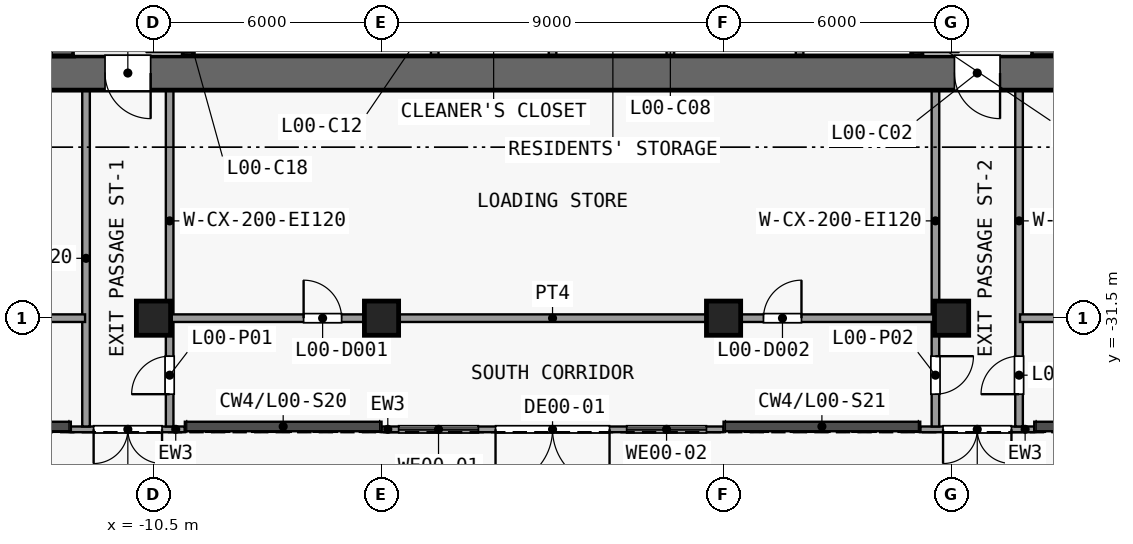
"""IFC4 building model, lengths in metres.
Left out: names, types, materials, properties, quantities, classifications, styles, units other than length and angle.
Written with IfcOpenShell. Run it as: python <this file> out.ifc"""

import sys

from ifc_helpers import new_model, si_unit, direction, frame, frame_2d, origin, origin_2d, place, context, subcontext, project, spatial, rectangle, extrude, element, fill, save


model = new_model("IFC4")
c1 = context("Model", 3, precision=1e-05, world=origin(), true_north=direction((0.0, 1.0)))
c2 = subcontext(c1, "Body", "Model", "MODEL_VIEW")
j1 = project(units=[si_unit("LENGTHUNIT", "METRE"), si_unit("PLANEANGLEUNIT", "RADIAN")], contexts=[c1])
p1 = place(None, origin())
s1 = spatial("IfcSite", under=j1, at=p1, CompositionType="ELEMENT")
p2 = place(p1, origin())
s2 = spatial("IfcBuilding", under=s1, at=p2, CompositionType="ELEMENT")
p3 = place(p2, origin())
s3 = spatial("IfcBuildingStorey", under=s2, at=p3, CompositionType="ELEMENT", Elevation=0.0)
for number, where, z_axis, x_axis in (
    (1, (-10.5, -31.5, 0.0), (0.0, 0.0, 1.0), (1.0, 0.0, 0.0)),
    (2, (-4.5, -31.5, 0.0), (0.0, 0.0, 1.0), (1.0, 0.0, 0.0)),
    (3, (4.5, -31.5, 0.0), (0.0, 0.0, 1.0), (1.0, 0.0, 0.0)),
    (4, (10.5, -31.5, 0.0), (0.0, 0.0, 1.0), (1.0, 0.0, 0.0)),
):
    element("IfcColumn", number, at=place(p3, frame(where, z_axis=z_axis, x_axis=x_axis)), inside=s3, PredefinedType="COLUMN", context=c2, shape_type="SweptSolid", body=[
        extrude(rectangle(XDim=0.9, YDim=0.9, at=origin_2d()), origin(), (0.0, 0.0, 1.0), 8.0),
    ])
p4 = place(p3, frame((13.5, -25.05, 0.0), z_axis=(0.0, 0.0, 1.0), x_axis=(-1.0, 0.0, 0.0)))
e5 = element("IfcWall", 5, at=p4, inside=s3, PredefinedType="SHEAR", context=c2, shape_type="SweptSolid", body=[
    extrude(rectangle(XDim=27.0, YDim=0.9, at=frame_2d((13.5, 0.0))), origin(), (0.0, 0.0, 1.0), 7.65),
])
p5 = place(p4, frame((24.075, 0.0, 0.0)))
e6 = element("IfcOpeningElement", 6, at=p5, cuts=e5, PredefinedType="OPENING", context=c2, shape_type="SweptSolid", body=[
    extrude(rectangle(XDim=1.2, YDim=2.1, at=frame_2d((0.6, 1.05))), frame((0.0, 0.46, 0.0), z_axis=(0.0, -1.0, 0.0), x_axis=(1.0, 0.0, 0.0)), (0.0, 0.0, 1.0), 0.92),
])
p6 = place(p4, frame((1.725, 0.0, 0.0)))
e7 = element("IfcOpeningElement", 7, at=p6, cuts=e5, PredefinedType="OPENING", context=c2, shape_type="SweptSolid", body=[
    extrude(rectangle(XDim=1.2, YDim=2.1, at=frame_2d((0.6, 1.05))), frame((0.0, 0.46, 0.0), z_axis=(0.0, -1.0, 0.0), x_axis=(1.0, 0.0, 0.0)), (0.0, 0.0, 1.0), 0.92),
])
p7 = place(p3, frame((-13.05, -8.5, 0.0), z_axis=(0.0, 0.0, 1.0), x_axis=(0.0, -1.0, 0.0)))
e8 = element("IfcWall", 8, at=p7, inside=s3, PredefinedType="SHEAR", context=c2, shape_type="SweptSolid", body=[
    extrude(rectangle(XDim=16.1, YDim=0.9, at=frame_2d((8.05, 0.0))), origin(), (0.0, 0.0, 1.0), 7.65),
])
p8 = place(p7, frame((14.8, 0.0, 0.0)))
e9 = element("IfcOpeningElement", 9, at=p8, cuts=e8, PredefinedType="OPENING", context=c2, shape_type="SweptSolid", body=[
    extrude(rectangle(XDim=1.1, YDim=2.1, at=frame_2d((0.55, 1.05))), frame((0.0, 0.46, 0.0), z_axis=(0.0, -1.0, 0.0), x_axis=(1.0, 0.0, 0.0)), (0.0, 0.0, 1.0), 0.92),
])
p9 = place(p3, frame((13.05, -24.6, 0.0), z_axis=(0.0, 0.0, 1.0), x_axis=(0.0, 1.0, 0.0)))
e10 = element("IfcWall", 10, at=p9, inside=s3, PredefinedType="SHEAR", context=c2, shape_type="SweptSolid", body=[
    extrude(rectangle(XDim=16.1, YDim=0.9, at=frame_2d((8.05, 0.0))), origin(), (0.0, 0.0, 1.0), 7.65),
])
p10 = place(p3, frame((-9.6, -24.6, 0.0), z_axis=(0.0, 0.0, 1.0), x_axis=(0.0, 1.0, 0.0)))
e11 = element("IfcWall", 11, at=p10, inside=s3, PredefinedType="SHEAR", context=c2, shape_type="SweptSolid", body=[
    extrude(rectangle(XDim=7.7, YDim=0.3, at=frame_2d((3.85, 0.0))), origin(), (0.0, 0.0, 1.0), 7.65),
])
p11 = place(p10, frame((0.1, 0.0, 0.0)))
e12 = element("IfcOpeningElement", 12, at=p11, cuts=e11, PredefinedType="OPENING", context=c2, shape_type="SweptSolid", body=[
    extrude(rectangle(XDim=1.1, YDim=2.1, at=frame_2d((0.55, 1.05))), frame((0.0, 0.16, 0.0), z_axis=(0.0, -1.0, 0.0), x_axis=(1.0, 0.0, 0.0)), (0.0, 0.0, 1.0), 0.32),
])
p12 = place(p3, frame((-3.1, -22.55, 0.0), z_axis=(0.0, 0.0, 1.0), x_axis=(0.0, -1.0, 0.0)))
e13 = element("IfcWall", 13, at=p12, inside=s3, PredefinedType="PARTITIONING", context=c2, shape_type="SweptSolid", body=[
    extrude(rectangle(XDim=2.05, YDim=0.2, at=frame_2d((1.025, 0.0))), origin(), (0.0, 0.0, 1.0), 7.65),
])
p13 = place(p12, frame((0.5, 0.0, 0.0)))
e14 = element("IfcOpeningElement", 14, at=p13, cuts=e13, PredefinedType="OPENING", context=c2, shape_type="SweptSolid", body=[
    extrude(rectangle(XDim=0.9, YDim=2.1, at=frame_2d((0.45, 1.05))), frame((0.0, 0.11, 0.0), z_axis=(0.0, -1.0, 0.0), x_axis=(1.0, 0.0, 0.0)), (0.0, 0.0, 1.0), 0.22),
])
p14 = place(p3, frame((0.0, -24.6, 0.0), z_axis=(0.0, 0.0, 1.0), x_axis=(0.0, 1.0, 0.0)))
e15 = element("IfcWall", 15, at=p14, inside=s3, PredefinedType="PARTITIONING", context=c2, shape_type="SweptSolid", body=[
    extrude(rectangle(XDim=2.05, YDim=0.2, at=frame_2d((1.025, 0.0))), origin(), (0.0, 0.0, 1.0), 7.65),
])
p15 = place(p3, frame((3.1, -24.6, 0.0), z_axis=(0.0, 0.0, 1.0), x_axis=(0.0, 1.0, 0.0)))
e16 = element("IfcWall", 16, at=p15, inside=s3, PredefinedType="PARTITIONING", context=c2, shape_type="SweptSolid", body=[
    extrude(rectangle(XDim=2.05, YDim=0.2, at=frame_2d((1.025, 0.0))), origin(), (0.0, 0.0, 1.0), 7.65),
])
p16 = place(p15, frame((0.65, 0.0, 0.0)))
e17 = element("IfcOpeningElement", 17, at=p16, cuts=e16, PredefinedType="OPENING", context=c2, shape_type="SweptSolid", body=[
    extrude(rectangle(XDim=0.9, YDim=2.1, at=frame_2d((0.45, 1.05))), frame((0.0, 0.11, 0.0), z_axis=(0.0, -1.0, 0.0), x_axis=(1.0, 0.0, 0.0)), (0.0, 0.0, 1.0), 0.22),
])
p17 = place(p3, frame((6.5, -22.55, 0.0), z_axis=(0.0, 0.0, 1.0), x_axis=(0.0, -1.0, 0.0)))
e18 = element("IfcWall", 18, at=p17, inside=s3, PredefinedType="PARTITIONING", context=c2, shape_type="SweptSolid", body=[
    extrude(rectangle(XDim=2.05, YDim=0.2, at=frame_2d((1.025, 0.0))), origin(), (0.0, 0.0, 1.0), 7.65),
])
p18 = place(p17, frame((0.35, 0.0, 0.0)))
e19 = element("IfcOpeningElement", 19, at=p18, cuts=e18, PredefinedType="OPENING", context=c2, shape_type="SweptSolid", body=[
    extrude(rectangle(XDim=1.2, YDim=2.1, at=frame_2d((0.6, 1.05))), frame((0.0, 0.11, 0.0), z_axis=(0.0, -1.0, 0.0), x_axis=(1.0, 0.0, 0.0)), (0.0, 0.0, 1.0), 0.22),
])
p19 = place(p3, frame((9.6, -16.9, 0.0), z_axis=(0.0, 0.0, 1.0), x_axis=(0.0, -1.0, 0.0)))
e20 = element("IfcWall", 20, at=p19, inside=s3, PredefinedType="SHEAR", context=c2, shape_type="SweptSolid", body=[
    extrude(rectangle(XDim=7.7, YDim=0.3, at=frame_2d((3.85, 0.0))), origin(), (0.0, 0.0, 1.0), 7.65),
])
p20 = place(p19, frame((6.5, 0.0, 0.0)))
e21 = element("IfcOpeningElement", 21, at=p20, cuts=e20, PredefinedType="OPENING", context=c2, shape_type="SweptSolid", body=[
    extrude(rectangle(XDim=1.1, YDim=2.1, at=frame_2d((0.55, 1.05))), frame((0.0, 0.16, 0.0), z_axis=(0.0, -1.0, 0.0), x_axis=(1.0, 0.0, 0.0)), (0.0, 0.0, 1.0), 0.32),
])
p21 = place(p3, frame((-12.275, -25.5, 0.0), z_axis=(0.0, 0.0, 1.0), x_axis=(0.0, -1.0, 0.0)))
e22 = element("IfcWall", 22, at=p21, inside=s3, PredefinedType="PARTITIONING", context=c2, shape_type="SweptSolid", body=[
    extrude(rectangle(XDim=8.85, YDim=0.2, at=frame_2d((4.425, 0.0))), origin(), (0.0, 0.0, 1.0), 7.65),
])
p22 = place(p3, frame((-10.075, -34.35, 0.0), z_axis=(0.0, 0.0, 1.0), x_axis=(0.0, 1.0, 0.0)))
e23 = element("IfcWall", 23, at=p22, inside=s3, PredefinedType="PARTITIONING", context=c2, shape_type="SweptSolid", body=[
    extrude(rectangle(XDim=8.85, YDim=0.2, at=frame_2d((4.425, 0.0))), origin(), (0.0, 0.0, 1.0), 7.65),
])
p23 = place(p22, frame((0.85, 0.0, 0.0)))
e24 = element("IfcOpeningElement", 24, at=p23, cuts=e23, PredefinedType="OPENING", context=c2, shape_type="SweptSolid", body=[
    extrude(rectangle(XDim=1.0, YDim=2.1, at=frame_2d((0.5, 1.05))), frame((0.0, 0.11, 0.0), z_axis=(0.0, -1.0, 0.0), x_axis=(1.0, 0.0, 0.0)), (0.0, 0.0, 1.0), 0.22),
])
p24 = place(p3, frame((10.075, -25.5, 0.0), z_axis=(0.0, 0.0, 1.0), x_axis=(0.0, -1.0, 0.0)))
e25 = element("IfcWall", 25, at=p24, inside=s3, PredefinedType="PARTITIONING", context=c2, shape_type="SweptSolid", body=[
    extrude(rectangle(XDim=8.85, YDim=0.2, at=frame_2d((4.425, 0.0))), origin(), (0.0, 0.0, 1.0), 7.65),
])
p25 = place(p24, frame((7.0, 0.0, 0.0)))
e26 = element("IfcOpeningElement", 26, at=p25, cuts=e25, PredefinedType="OPENING", context=c2, shape_type="SweptSolid", body=[
    extrude(rectangle(XDim=1.0, YDim=2.1, at=frame_2d((0.5, 1.05))), frame((0.0, 0.11, 0.0), z_axis=(0.0, -1.0, 0.0), x_axis=(1.0, 0.0, 0.0)), (0.0, 0.0, 1.0), 0.22),
])
p26 = place(p3, frame((12.275, -34.35, 0.0), z_axis=(0.0, 0.0, 1.0), x_axis=(0.0, 1.0, 0.0)))
e27 = element("IfcWall", 27, at=p26, inside=s3, PredefinedType="PARTITIONING", context=c2, shape_type="SweptSolid", body=[
    extrude(rectangle(XDim=8.85, YDim=0.2, at=frame_2d((4.425, 0.0))), origin(), (0.0, 0.0, 1.0), 7.65),
])
p27 = place(p26, frame((0.85, 0.0, 0.0)))
e28 = element("IfcOpeningElement", 28, at=p27, cuts=e27, PredefinedType="OPENING", context=c2, shape_type="SweptSolid", body=[
    extrude(rectangle(XDim=1.0, YDim=2.1, at=frame_2d((0.5, 1.05))), frame((0.0, 0.11, 0.0), z_axis=(0.0, -1.0, 0.0), x_axis=(1.0, 0.0, 0.0)), (0.0, 0.0, 1.0), 0.22),
])
p28 = place(p3, frame((4.5, -34.425, 0.0), z_axis=(0.0, 0.0, 1.0), x_axis=(-1.0, 0.0, 0.0)))
e29 = element("IfcWall", 29, at=p28, inside=s3, PredefinedType="SOLIDWALL", context=c2, shape_type="SweptSolid", body=[
    extrude(rectangle(XDim=9.0, YDim=0.15, at=frame_2d((4.5, 0.0))), origin(), (0.0, 0.0, 1.0), 7.65),
])
p29 = place(p28, frame((3.0, 0.0, 0.0)))
e30 = element("IfcOpeningElement", 30, at=p29, cuts=e29, PredefinedType="OPENING", context=c2, shape_type="SweptSolid", body=[
    extrude(rectangle(XDim=3.0, YDim=3.6, at=frame_2d((1.5, 1.8))), frame((0.0, 0.085, 0.0), z_axis=(0.0, -1.0, 0.0), x_axis=(1.0, 0.0, 0.0)), (0.0, 0.0, 1.0), 0.17),
])
p30 = place(p28, frame((6.45, 0.0, 0.0)))
e31 = element("IfcOpeningElement", 31, at=p30, cuts=e29, PredefinedType="OPENING", context=c2, shape_type="SweptSolid", body=[
    extrude(rectangle(XDim=2.1, YDim=5.0, at=frame_2d((1.05, 2.5))), frame((0.0, 0.085, 0.0), z_axis=(0.0, -1.0, 0.0), x_axis=(1.0, 0.0, 0.0)), (0.0, 0.0, 1.0), 0.17),
])
p31 = place(p28, frame((0.45, 0.0, 0.0)))
e32 = element("IfcOpeningElement", 32, at=p31, cuts=e29, PredefinedType="OPENING", context=c2, shape_type="SweptSolid", body=[
    extrude(rectangle(XDim=2.1, YDim=5.0, at=frame_2d((1.05, 2.5))), frame((0.0, 0.085, 0.0), z_axis=(0.0, -1.0, 0.0), x_axis=(1.0, 0.0, 0.0)), (0.0, 0.0, 1.0), 0.17),
])
p32 = place(p3, frame((-9.675, -34.425, 0.0), z_axis=(0.0, 0.0, 1.0), x_axis=(-1.0, 0.0, 0.0)))
e33 = element("IfcWall", 33, at=p32, inside=s3, PredefinedType="SOLIDWALL", context=c2, shape_type="SweptSolid", body=[
    extrude(rectangle(XDim=3.0, YDim=0.15, at=frame_2d((1.5, 0.0))), origin(), (0.0, 0.0, 1.0), 7.65),
])
p33 = place(p32, frame((0.6, 0.0, 0.0)))
e34 = element("IfcOpeningElement", 34, at=p33, cuts=e33, PredefinedType="OPENING", context=c2, shape_type="SweptSolid", body=[
    extrude(rectangle(XDim=1.8, YDim=2.1, at=frame_2d((0.9, 1.05))), frame((0.0, 0.085, 0.0), z_axis=(0.0, -1.0, 0.0), x_axis=(1.0, 0.0, 0.0)), (0.0, 0.0, 1.0), 0.17),
])
p34 = place(p3, frame((12.675, -34.425, 0.0), z_axis=(0.0, 0.0, 1.0), x_axis=(-1.0, 0.0, 0.0)))
e35 = element("IfcWall", 35, at=p34, inside=s3, PredefinedType="SOLIDWALL", context=c2, shape_type="SweptSolid", body=[
    extrude(rectangle(XDim=3.0, YDim=0.15, at=frame_2d((1.5, 0.0))), origin(), (0.0, 0.0, 1.0), 7.65),
])
p35 = place(p34, frame((0.6, 0.0, 0.0)))
e36 = element("IfcOpeningElement", 36, at=p35, cuts=e35, PredefinedType="OPENING", context=c2, shape_type="SweptSolid", body=[
    extrude(rectangle(XDim=1.8, YDim=2.1, at=frame_2d((0.9, 1.05))), frame((0.0, 0.085, 0.0), z_axis=(0.0, -1.0, 0.0), x_axis=(1.0, 0.0, 0.0)), (0.0, 0.0, 1.0), 0.17),
])
p36 = place(p3, frame((-25.9, -31.5, 0.0), z_axis=(0.0, 0.0, 1.0), x_axis=(1.0, 0.0, 0.0)))
e37 = element("IfcWall", 37, at=p36, inside=s3, PredefinedType="PARTITIONING", context=c2, shape_type="SweptSolid", body=[
    extrude(rectangle(XDim=13.6, YDim=0.2, at=frame_2d((6.8, 0.0))), origin(), (0.0, 0.0, 1.0), 7.65),
])
p37 = place(p3, frame((-10.05, -31.5, 0.0), z_axis=(0.0, 0.0, 1.0), x_axis=(1.0, 0.0, 0.0)))
e38 = element("IfcWall", 38, at=p37, inside=s3, PredefinedType="PARTITIONING", context=c2, shape_type="SweptSolid", body=[
    extrude(rectangle(XDim=20.1, YDim=0.2, at=frame_2d((10.05, 0.0))), origin(), (0.0, 0.0, 1.0), 7.65),
])
p38 = place(p37, frame((3.5, 0.0, 0.0)))
e39 = element("IfcOpeningElement", 39, at=p38, cuts=e38, PredefinedType="OPENING", context=c2, shape_type="SweptSolid", body=[
    extrude(rectangle(XDim=1.0, YDim=2.1, at=frame_2d((0.5, 1.05))), frame((0.0, 0.11, 0.0), z_axis=(0.0, -1.0, 0.0), x_axis=(1.0, 0.0, 0.0)), (0.0, 0.0, 1.0), 0.22),
])
p39 = place(p37, frame((15.6, 0.0, 0.0)))
e40 = element("IfcOpeningElement", 40, at=p39, cuts=e38, PredefinedType="OPENING", context=c2, shape_type="SweptSolid", body=[
    extrude(rectangle(XDim=1.0, YDim=2.1, at=frame_2d((0.5, 1.05))), frame((0.0, 0.11, 0.0), z_axis=(0.0, -1.0, 0.0), x_axis=(1.0, 0.0, 0.0)), (0.0, 0.0, 1.0), 0.22),
])
p40 = place(p3, frame((12.3, -31.5, 0.0), z_axis=(0.0, 0.0, 1.0), x_axis=(1.0, 0.0, 0.0)))
e41 = element("IfcWall", 41, at=p40, inside=s3, PredefinedType="PARTITIONING", context=c2, shape_type="SweptSolid", body=[
    extrude(rectangle(XDim=10.2, YDim=0.2, at=frame_2d((5.1, 0.0))), origin(), (0.0, 0.0, 1.0), 7.65),
])
p41 = place(p40, frame((1.5, 0.0, 0.0)))
e42 = element("IfcOpeningElement", 42, at=p41, cuts=e41, PredefinedType="OPENING", context=c2, shape_type="SweptSolid", body=[
    extrude(rectangle(XDim=1.0, YDim=2.1, at=frame_2d((0.5, 1.05))), frame((0.0, 0.11, 0.0), z_axis=(0.0, -1.0, 0.0), x_axis=(1.0, 0.0, 0.0)), (0.0, 0.0, 1.0), 0.22),
])
p42 = place(p40, frame((7.7, 0.0, 0.0)))
e43 = element("IfcOpeningElement", 43, at=p42, cuts=e41, PredefinedType="OPENING", context=c2, shape_type="SweptSolid", body=[
    extrude(rectangle(XDim=1.0, YDim=2.1, at=frame_2d((0.5, 1.05))), frame((0.0, 0.11, 0.0), z_axis=(0.0, -1.0, 0.0), x_axis=(1.0, 0.0, 0.0)), (0.0, 0.0, 1.0), 0.22),
])
p43 = place(p5, origin())
e44 = element("IfcDoor", 44, at=p43, inside=s3, OperationType="SINGLE_SWING_LEFT", PredefinedType="DOOR", context=c2, shape_type="SweptSolid", body=[
    extrude(rectangle(XDim=1.2, YDim=2.1, at=frame_2d((0.6, 1.05))), frame((0.0, 0.025, 0.0), z_axis=(0.0, -1.0, 0.0), x_axis=(1.0, 0.0, 0.0)), (0.0, 0.0, 1.0), 0.05),
])
fill(e6, e44)
p44 = place(p6, origin())
e45 = element("IfcDoor", 45, at=p44, inside=s3, OperationType="SINGLE_SWING_LEFT", PredefinedType="DOOR", context=c2, shape_type="SweptSolid", body=[
    extrude(rectangle(XDim=1.2, YDim=2.1, at=frame_2d((0.6, 1.05))), frame((0.0, 0.025, 0.0), z_axis=(0.0, -1.0, 0.0), x_axis=(1.0, 0.0, 0.0)), (0.0, 0.0, 1.0), 0.05),
])
fill(e7, e45)
p45 = place(p23, origin())
e46 = element("IfcDoor", 46, at=p45, inside=s3, OperationType="SINGLE_SWING_LEFT", PredefinedType="DOOR", context=c2, shape_type="SweptSolid", body=[
    extrude(rectangle(XDim=1.0, YDim=2.1, at=frame_2d((0.5, 1.05))), frame((0.0, 0.025, 0.0), z_axis=(0.0, -1.0, 0.0), x_axis=(1.0, 0.0, 0.0)), (0.0, 0.0, 1.0), 0.05),
])
fill(e24, e46)
p46 = place(p25, origin())
e47 = element("IfcDoor", 47, at=p46, inside=s3, OperationType="SINGLE_SWING_LEFT", PredefinedType="DOOR", context=c2, shape_type="SweptSolid", body=[
    extrude(rectangle(XDim=1.0, YDim=2.1, at=frame_2d((0.5, 1.05))), frame((0.0, 0.025, 0.0), z_axis=(0.0, -1.0, 0.0), x_axis=(1.0, 0.0, 0.0)), (0.0, 0.0, 1.0), 0.05),
])
fill(e26, e47)
p47 = place(p27, origin())
e48 = element("IfcDoor", 48, at=p47, inside=s3, OperationType="SINGLE_SWING_LEFT", PredefinedType="DOOR", context=c2, shape_type="SweptSolid", body=[
    extrude(rectangle(XDim=1.0, YDim=2.1, at=frame_2d((0.5, 1.05))), frame((0.0, 0.025, 0.0), z_axis=(0.0, -1.0, 0.0), x_axis=(1.0, 0.0, 0.0)), (0.0, 0.0, 1.0), 0.05),
])
fill(e28, e48)
p48 = place(p29, origin())
e49 = element("IfcDoor", 49, at=p48, inside=s3, OperationType="DOUBLE_DOOR_SINGLE_SWING", PredefinedType="DOOR", context=c2, shape_type="SweptSolid", body=[
    extrude(rectangle(XDim=3.0, YDim=3.6, at=frame_2d((1.5, 1.8))), frame((0.0, 0.025, 0.0), z_axis=(0.0, -1.0, 0.0), x_axis=(1.0, 0.0, 0.0)), (0.0, 0.0, 1.0), 0.05),
])
fill(e30, e49)
p49 = place(p30, origin())
e50 = element("IfcWindow", 50, at=p49, inside=s3, PartitioningType="SINGLE_PANEL", PredefinedType="WINDOW", context=c2, shape_type="SweptSolid", body=[
    extrude(rectangle(XDim=2.1, YDim=5.0, at=frame_2d((1.05, 2.5))), frame((0.0, 0.03, 0.0), z_axis=(0.0, -1.0, 0.0), x_axis=(1.0, 0.0, 0.0)), (0.0, 0.0, 1.0), 0.06),
])
fill(e31, e50)
p50 = place(p31, origin())
e51 = element("IfcWindow", 51, at=p50, inside=s3, PartitioningType="SINGLE_PANEL", PredefinedType="WINDOW", context=c2, shape_type="SweptSolid", body=[
    extrude(rectangle(XDim=2.1, YDim=5.0, at=frame_2d((1.05, 2.5))), frame((0.0, 0.03, 0.0), z_axis=(0.0, -1.0, 0.0), x_axis=(1.0, 0.0, 0.0)), (0.0, 0.0, 1.0), 0.06),
])
fill(e32, e51)
p51 = place(p33, origin())
e52 = element("IfcDoor", 52, at=p51, inside=s3, OperationType="DOUBLE_DOOR_SINGLE_SWING", PredefinedType="DOOR", context=c2, shape_type="SweptSolid", body=[
    extrude(rectangle(XDim=1.8, YDim=2.1, at=frame_2d((0.9, 1.05))), frame((0.0, 0.025, 0.0), z_axis=(0.0, -1.0, 0.0), x_axis=(1.0, 0.0, 0.0)), (0.0, 0.0, 1.0), 0.05),
])
fill(e34, e52)
p52 = place(p35, origin())
e53 = element("IfcDoor", 53, at=p52, inside=s3, OperationType="DOUBLE_DOOR_SINGLE_SWING", PredefinedType="DOOR", context=c2, shape_type="SweptSolid", body=[
    extrude(rectangle(XDim=1.8, YDim=2.1, at=frame_2d((0.9, 1.05))), frame((0.0, 0.025, 0.0), z_axis=(0.0, -1.0, 0.0), x_axis=(1.0, 0.0, 0.0)), (0.0, 0.0, 1.0), 0.05),
])
fill(e36, e53)
p53 = place(p38, origin())
e54 = element("IfcDoor", 54, at=p53, inside=s3, OperationType="SINGLE_SWING_RIGHT", PredefinedType="DOOR", context=c2, shape_type="SweptSolid", body=[
    extrude(rectangle(XDim=1.0, YDim=2.1, at=frame_2d((0.5, 1.05))), frame((0.0, 0.025, 0.0), z_axis=(0.0, -1.0, 0.0), x_axis=(1.0, 0.0, 0.0)), (0.0, 0.0, 1.0), 0.05),
])
fill(e39, e54)
p54 = place(p39, origin())
e55 = element("IfcDoor", 55, at=p54, inside=s3, OperationType="SINGLE_SWING_LEFT", PredefinedType="DOOR", context=c2, shape_type="SweptSolid", body=[
    extrude(rectangle(XDim=1.0, YDim=2.1, at=frame_2d((0.5, 1.05))), frame((0.0, 0.025, 0.0), z_axis=(0.0, -1.0, 0.0), x_axis=(1.0, 0.0, 0.0)), (0.0, 0.0, 1.0), 0.05),
])
fill(e40, e55)
save(model, sys.argv[1])
